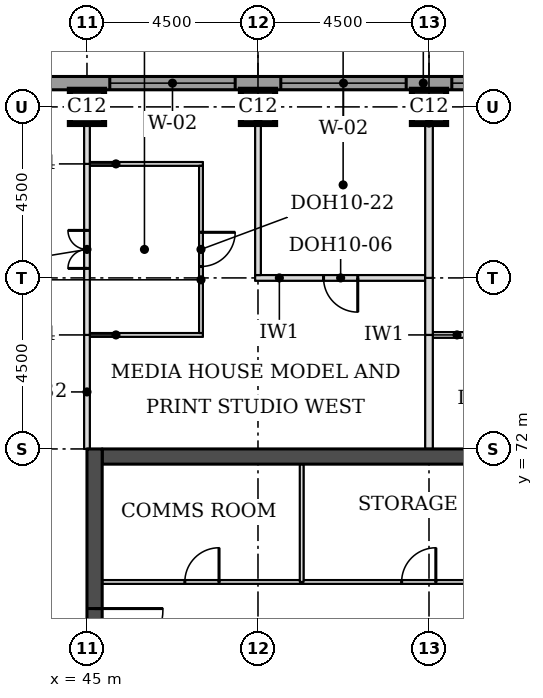
"""IFC4 building model, lengths in metres.
Left out: names, types, materials, properties, quantities, classifications, styles, units other than length and angle.
Written with IfcOpenShell. Run it as: python <this file> out.ifc"""

import sys

from ifc_helpers import new_model, si_unit, direction, frame, frame_2d, origin, origin_2d, place, context, subcontext, project, spatial, rectangle, extrude, element, fill, save


model = new_model("IFC4")
c1 = context("Model", 3, precision=1e-05, world=origin(), true_north=direction((0.0, 1.0)))
c2 = subcontext(c1, "Body", "Model", "MODEL_VIEW")
j1 = project(units=[si_unit("LENGTHUNIT", "METRE"), si_unit("PLANEANGLEUNIT", "RADIAN")], contexts=[c1])
p1 = place(None, origin())
s1 = spatial("IfcSite", under=j1, at=p1, CompositionType="ELEMENT")
p2 = place(p1, origin())
s2 = spatial("IfcBuilding", under=s1, at=p2, CompositionType="ELEMENT")
p3 = place(p2, frame((0.0, 0.0, 223.0)))
s3 = spatial("IfcBuildingStorey", under=s2, at=p3, CompositionType="ELEMENT", Elevation=223.0)
for number, where, z_axis, x_axis in (
    (1, (45.0, 81.0, 0.0), (0.0, 0.0, 1.0), (1.0, 0.0, 0.0)),
    (2, (49.5, 81.0, 0.0), (0.0, 0.0, 1.0), (1.0, 0.0, 0.0)),
    (3, (54.0, 81.0, 0.0), (0.0, 0.0, 1.0), (1.0, 0.0, 0.0)),
):
    element("IfcColumn", number, at=place(p3, frame(where, z_axis=z_axis, x_axis=x_axis)), inside=s3, PredefinedType="COLUMN", context=c2, shape_type="SweptSolid", body=[
        extrude(rectangle(XDim=0.9, YDim=0.9, at=origin_2d()), origin(), (0.0, 0.0, 1.0), 3.7),
    ])
p4 = place(p3, frame((45.4, 71.8, 0.0), z_axis=(0.0, 0.0, 1.0), x_axis=(1.0, 0.0, 0.0)))
e4 = element("IfcWall", 4, at=p4, inside=s3, PredefinedType="SHEAR", context=c2, shape_type="SweptSolid", body=[
    extrude(rectangle(XDim=21.7, YDim=0.4, at=frame_2d((10.85, 0.0))), origin(), (0.0, 0.0, 1.0), 3.7),
])
p5 = place(p3, frame((45.2, 49.5, 0.0), z_axis=(0.0, 0.0, 1.0), x_axis=(0.0, 1.0, 0.0)))
e5 = element("IfcWall", 5, at=p5, inside=s3, PredefinedType="SHEAR", context=c2, shape_type="SweptSolid", body=[
    extrude(rectangle(XDim=22.5, YDim=0.4, at=frame_2d((11.25, 0.0))), origin(), (0.0, 0.0, 1.0), 3.7),
])
p6 = place(p5, frame((4.2, 0.0, 0.0)))
e6 = element("IfcOpeningElement", 6, at=p6, cuts=e5, PredefinedType="OPENING", context=c2, shape_type="SweptSolid", body=[
    extrude(rectangle(XDim=1.8, YDim=2.1, at=frame_2d((0.9, 1.05))), frame((0.0, 0.21, 0.0), z_axis=(0.0, -1.0, 0.0), x_axis=(1.0, 0.0, 0.0)), (0.0, 0.0, 1.0), 0.42),
])
p7 = place(p5, frame((6.9, 0.0, 0.0)))
e7 = element("IfcOpeningElement", 7, at=p7, cuts=e5, PredefinedType="OPENING", context=c2, shape_type="SweptSolid", body=[
    extrude(rectangle(XDim=1.1, YDim=2.1, at=frame_2d((0.55, 1.05))), frame((0.0, 0.21, 0.0), z_axis=(0.0, -1.0, 0.0), x_axis=(1.0, 0.0, 0.0)), (0.0, 0.0, 1.0), 0.42),
])
p8 = place(p5, frame((13.6, 0.0, 0.0)))
e8 = element("IfcOpeningElement", 8, at=p8, cuts=e5, PredefinedType="OPENING", context=c2, shape_type="SweptSolid", body=[
    extrude(rectangle(XDim=1.1, YDim=2.1, at=frame_2d((0.55, 1.05))), frame((0.0, 0.21, 0.0), z_axis=(0.0, -1.0, 0.0), x_axis=(1.0, 0.0, 0.0)), (0.0, 0.0, 1.0), 0.42),
])
p9 = place(p5, frame((16.5, 0.0, 0.0)))
e9 = element("IfcOpeningElement", 9, at=p9, cuts=e5, PredefinedType="OPENING", context=c2, shape_type="SweptSolid", body=[
    extrude(rectangle(XDim=1.8, YDim=2.1, at=frame_2d((0.9, 1.05))), frame((0.0, 0.21, 0.0), z_axis=(0.0, -1.0, 0.0), x_axis=(1.0, 0.0, 0.0)), (0.0, 0.0, 1.0), 0.42),
])
p10 = place(p3, frame((72.331, 81.625, 0.0), z_axis=(0.0, 0.0, 1.0), x_axis=(-1.0, 0.0, 0.0)))
e10 = element("IfcWall", 10, at=p10, inside=s3, PredefinedType="STANDARD", context=c2, shape_type="SweptSolid", body=[
    extrude(rectangle(XDim=32.163, YDim=0.35, at=frame_2d((16.081, 0.0))), origin(), (0.0, 0.0, 1.0), 3.525),
])
p11 = place(p10, frame((5.431, 0.0, 0.9)))
e11 = element("IfcOpeningElement", 11, at=p11, cuts=e10, PredefinedType="OPENING", context=c2, shape_type="SweptSolid", body=[
    extrude(rectangle(XDim=3.3, YDim=1.9, at=frame_2d((1.65, 0.95))), frame((0.0, 0.185, 0.0), z_axis=(0.0, -1.0, 0.0), x_axis=(1.0, 0.0, 0.0)), (0.0, 0.0, 1.0), 0.37),
])
p12 = place(p10, frame((9.931, 0.0, 0.9)))
e12 = element("IfcOpeningElement", 12, at=p12, cuts=e10, PredefinedType="OPENING", context=c2, shape_type="SweptSolid", body=[
    extrude(rectangle(XDim=3.3, YDim=1.9, at=frame_2d((1.65, 0.95))), frame((0.0, 0.185, 0.0), z_axis=(0.0, -1.0, 0.0), x_axis=(1.0, 0.0, 0.0)), (0.0, 0.0, 1.0), 0.37),
])
p13 = place(p10, frame((14.431, 0.0, 0.9)))
e13 = element("IfcOpeningElement", 13, at=p13, cuts=e10, PredefinedType="OPENING", context=c2, shape_type="SweptSolid", body=[
    extrude(rectangle(XDim=3.3, YDim=1.9, at=frame_2d((1.65, 0.95))), frame((0.0, 0.185, 0.0), z_axis=(0.0, -1.0, 0.0), x_axis=(1.0, 0.0, 0.0)), (0.0, 0.0, 1.0), 0.37),
])
p14 = place(p10, frame((18.931, 0.0, 0.9)))
e14 = element("IfcOpeningElement", 14, at=p14, cuts=e10, PredefinedType="OPENING", context=c2, shape_type="SweptSolid", body=[
    extrude(rectangle(XDim=3.3, YDim=1.9, at=frame_2d((1.65, 0.95))), frame((0.0, 0.185, 0.0), z_axis=(0.0, -1.0, 0.0), x_axis=(1.0, 0.0, 0.0)), (0.0, 0.0, 1.0), 0.37),
])
p15 = place(p10, frame((23.431, 0.0, 0.9)))
e15 = element("IfcOpeningElement", 15, at=p15, cuts=e10, PredefinedType="OPENING", context=c2, shape_type="SweptSolid", body=[
    extrude(rectangle(XDim=3.3, YDim=1.9, at=frame_2d((1.65, 0.95))), frame((0.0, 0.185, 0.0), z_axis=(0.0, -1.0, 0.0), x_axis=(1.0, 0.0, 0.0)), (0.0, 0.0, 1.0), 0.37),
])
p16 = place(p3, frame((45.075, 75.0, 0.0), z_axis=(0.0, 0.0, 1.0), x_axis=(1.0, 0.0, 0.0)))
e16 = element("IfcWall", 16, at=p16, inside=s3, PredefinedType="PARTITIONING", context=c2, shape_type="SweptSolid", body=[
    extrude(rectangle(XDim=2.975, YDim=0.1, at=frame_2d((1.488, 0.0))), origin(), (0.0, 0.0, 1.0), 3.55),
])
p17 = place(p3, frame((54.1, 75.0, 0.0), z_axis=(0.0, 0.0, 1.0), x_axis=(1.0, 0.0, 0.0)))
e17 = element("IfcWall", 17, at=p17, inside=s3, PredefinedType="PARTITIONING", context=c2, shape_type="SweptSolid", body=[
    extrude(rectangle(XDim=4.475, YDim=0.15, at=frame_2d((2.237, 0.0))), origin(), (0.0, 0.0, 1.0), 3.55),
])
p18 = place(p17, frame((1.8, 0.0, 0.0)))
e18 = element("IfcOpeningElement", 18, at=p18, cuts=e17, PredefinedType="OPENING", context=c2, shape_type="SweptSolid", body=[
    extrude(rectangle(XDim=0.9, YDim=2.1, at=frame_2d((0.45, 1.05))), frame((0.0, 0.085, 0.0), z_axis=(0.0, -1.0, 0.0), x_axis=(1.0, 0.0, 0.0)), (0.0, 0.0, 1.0), 0.17),
])
p19 = place(p3, frame((49.425, 76.5, 0.0), z_axis=(0.0, 0.0, 1.0), x_axis=(1.0, 0.0, 0.0)))
e19 = element("IfcWall", 19, at=p19, inside=s3, PredefinedType="PARTITIONING", context=c2, shape_type="SweptSolid", body=[
    extrude(rectangle(XDim=4.475, YDim=0.15, at=frame_2d((2.237, 0.0))), origin(), (0.0, 0.0, 1.0), 3.55),
])
p20 = place(p19, frame((1.8, 0.0, 0.0)))
e20 = element("IfcOpeningElement", 20, at=p20, cuts=e19, PredefinedType="OPENING", context=c2, shape_type="SweptSolid", body=[
    extrude(rectangle(XDim=0.9, YDim=2.1, at=frame_2d((0.45, 1.05))), frame((0.0, 0.085, 0.0), z_axis=(0.0, -1.0, 0.0), x_axis=(1.0, 0.0, 0.0)), (0.0, 0.0, 1.0), 0.17),
])
p21 = place(p3, frame((45.075, 79.5, 0.0), z_axis=(0.0, 0.0, 1.0), x_axis=(1.0, 0.0, 0.0)))
e21 = element("IfcWall", 21, at=p21, inside=s3, PredefinedType="PARTITIONING", context=c2, shape_type="SweptSolid", body=[
    extrude(rectangle(XDim=2.975, YDim=0.1, at=frame_2d((1.488, 0.0))), origin(), (0.0, 0.0, 1.0), 3.55),
])
p22 = place(p3, frame((45.0, 72.0, 0.0), z_axis=(0.0, 0.0, 1.0), x_axis=(0.0, 1.0, 0.0)))
e22 = element("IfcWall", 22, at=p22, inside=s3, PredefinedType="PARTITIONING", context=c2, shape_type="SweptSolid", body=[
    extrude(rectangle(XDim=3.0, YDim=0.15, at=frame_2d((1.5, 0.0))), origin(), (0.0, 0.0, 1.0), 3.022),
])
p23 = place(p3, frame((54.0, 72.0, 0.0), z_axis=(0.0, 0.0, 1.0), x_axis=(0.0, 1.0, 0.0)))
e23 = element("IfcWall", 23, at=p23, inside=s3, PredefinedType="PARTITIONING", context=c2, shape_type="SweptSolid", body=[
    extrude(rectangle(XDim=3.0, YDim=0.2, at=frame_2d((1.5, 0.0))), origin(), (0.0, 0.0, 1.0), 3.55),
])
p24 = place(p3, frame((45.0, 75.0, 0.0), z_axis=(0.0, 0.0, 1.0), x_axis=(0.0, 1.0, 0.0)))
e24 = element("IfcWall", 24, at=p24, inside=s3, PredefinedType="PARTITIONING", context=c2, shape_type="SweptSolid", body=[
    extrude(rectangle(XDim=4.5, YDim=0.15, at=frame_2d((2.25, 0.0))), origin(), (0.0, 0.0, 1.0), 3.022),
])
p25 = place(p24, frame((1.75, 0.0, 0.0)))
e25 = element("IfcOpeningElement", 25, at=p25, cuts=e24, PredefinedType="OPENING", context=c2, shape_type="SweptSolid", body=[
    extrude(rectangle(XDim=1.0, YDim=2.1, at=frame_2d((0.5, 1.05))), frame((0.0, 0.085, 0.0), z_axis=(0.0, -1.0, 0.0), x_axis=(1.0, 0.0, 0.0)), (0.0, 0.0, 1.0), 0.17),
])
p26 = place(p3, frame((54.0, 75.0, 0.0), z_axis=(0.0, 0.0, 1.0), x_axis=(0.0, 1.0, 0.0)))
e26 = element("IfcWall", 26, at=p26, inside=s3, PredefinedType="PARTITIONING", context=c2, shape_type="SweptSolid", body=[
    extrude(rectangle(XDim=1.5, YDim=0.2, at=frame_2d((0.75, 0.0))), origin(), (0.0, 0.0, 1.0), 3.55),
])
p27 = place(p3, frame((48.0, 75.05, 0.0), z_axis=(0.0, 0.0, 1.0), x_axis=(0.0, 1.0, 0.0)))
e27 = element("IfcWall", 27, at=p27, inside=s3, PredefinedType="PARTITIONING", context=c2, shape_type="SweptSolid", body=[
    extrude(rectangle(XDim=4.4, YDim=0.1, at=frame_2d((2.2, 0.0))), origin(), (0.0, 0.0, 1.0), 3.55),
])
p28 = place(p27, frame((1.75, 0.0, 0.0)))
e28 = element("IfcOpeningElement", 28, at=p28, cuts=e27, PredefinedType="OPENING", context=c2, shape_type="SweptSolid", body=[
    extrude(rectangle(XDim=0.9, YDim=2.1, at=frame_2d((0.45, 1.05))), frame((0.0, 0.06, 0.0), z_axis=(0.0, -1.0, 0.0), x_axis=(1.0, 0.0, 0.0)), (0.0, 0.0, 1.0), 0.12),
])
p29 = place(p3, frame((54.0, 76.5, 0.0), z_axis=(0.0, 0.0, 1.0), x_axis=(0.0, 1.0, 0.0)))
e29 = element("IfcWall", 29, at=p29, inside=s3, PredefinedType="PARTITIONING", context=c2, shape_type="SweptSolid", body=[
    extrude(rectangle(XDim=4.95, YDim=0.2, at=frame_2d((2.475, 0.0))), origin(), (0.0, 0.0, 1.0), 3.55),
])
p30 = place(p3, frame((49.5, 76.575, 0.0), z_axis=(0.0, 0.0, 1.0), x_axis=(0.0, 1.0, 0.0)))
e30 = element("IfcWall", 30, at=p30, inside=s3, PredefinedType="PARTITIONING", context=c2, shape_type="SweptSolid", body=[
    extrude(rectangle(XDim=4.875, YDim=0.15, at=frame_2d((2.438, 0.0))), origin(), (0.0, 0.0, 1.0), 3.55),
])
p31 = place(p3, frame((45.0, 79.5, 0.0), z_axis=(0.0, 0.0, 1.0), x_axis=(0.0, 1.0, 0.0)))
e31 = element("IfcWall", 31, at=p31, inside=s3, PredefinedType="PARTITIONING", context=c2, shape_type="SweptSolid", body=[
    extrude(rectangle(XDim=1.95, YDim=0.15, at=frame_2d((0.975, 0.0))), origin(), (0.0, 0.0, 1.0), 3.022),
])
p32 = place(p3, frame((45.4, 68.5, 0.0), z_axis=(0.0, 0.0, 1.0), x_axis=(1.0, 0.0, 0.0)))
e32 = element("IfcWall", 32, at=p32, inside=s3, PredefinedType="PARTITIONING", context=c2, shape_type="SweptSolid", body=[
    extrude(rectangle(XDim=21.7, YDim=0.1, at=frame_2d((10.85, 0.0))), origin(), (0.0, 0.0, 1.0), 3.55),
])
p33 = place(p32, frame((20.069, 0.0, 0.0)))
e33 = element("IfcOpeningElement", 33, at=p33, cuts=e32, PredefinedType="OPENING", context=c2, shape_type="SweptSolid", body=[
    extrude(rectangle(XDim=0.9, YDim=2.1, at=frame_2d((0.45, 1.05))), frame((0.0, 0.06, 0.0), z_axis=(0.0, -1.0, 0.0), x_axis=(1.0, 0.0, 0.0)), (0.0, 0.0, 1.0), 0.12),
])
p34 = place(p32, frame((17.444, 0.0, 0.0)))
e34 = element("IfcOpeningElement", 34, at=p34, cuts=e32, PredefinedType="OPENING", context=c2, shape_type="SweptSolid", body=[
    extrude(rectangle(XDim=0.9, YDim=2.1, at=frame_2d((0.45, 1.05))), frame((0.0, 0.06, 0.0), z_axis=(0.0, -1.0, 0.0), x_axis=(1.0, 0.0, 0.0)), (0.0, 0.0, 1.0), 0.12),
])
p35 = place(p32, frame((2.175, 0.0, 0.0)))
e35 = element("IfcOpeningElement", 35, at=p35, cuts=e32, PredefinedType="OPENING", context=c2, shape_type="SweptSolid", body=[
    extrude(rectangle(XDim=0.9, YDim=2.1, at=frame_2d((0.45, 1.05))), frame((0.0, 0.06, 0.0), z_axis=(0.0, -1.0, 0.0), x_axis=(1.0, 0.0, 0.0)), (0.0, 0.0, 1.0), 0.12),
])
p36 = place(p32, frame((13.48, 0.0, 0.0)))
e36 = element("IfcOpeningElement", 36, at=p36, cuts=e32, PredefinedType="OPENING", context=c2, shape_type="SweptSolid", body=[
    extrude(rectangle(XDim=0.9, YDim=2.1, at=frame_2d((0.45, 1.05))), frame((0.0, 0.06, 0.0), z_axis=(0.0, -1.0, 0.0), x_axis=(1.0, 0.0, 0.0)), (0.0, 0.0, 1.0), 0.12),
])
p37 = place(p32, frame((7.88, 0.0, 0.0)))
e37 = element("IfcOpeningElement", 37, at=p37, cuts=e32, PredefinedType="OPENING", context=c2, shape_type="SweptSolid", body=[
    extrude(rectangle(XDim=0.9, YDim=2.1, at=frame_2d((0.45, 1.05))), frame((0.0, 0.06, 0.0), z_axis=(0.0, -1.0, 0.0), x_axis=(1.0, 0.0, 0.0)), (0.0, 0.0, 1.0), 0.12),
])
p38 = place(p3, frame((50.65, 68.5, 0.0), z_axis=(0.0, 0.0, 1.0), x_axis=(0.0, 1.0, 0.0)))
e38 = element("IfcWall", 38, at=p38, inside=s3, PredefinedType="PARTITIONING", context=c2, shape_type="SweptSolid", body=[
    extrude(rectangle(XDim=3.1, YDim=0.1, at=frame_2d((1.55, 0.0))), origin(), (0.0, 0.0, 1.0), 3.55),
])
p39 = place(p13, origin())
e39 = element("IfcWindow", 39, at=p39, inside=s3, PartitioningType="SINGLE_PANEL", PredefinedType="WINDOW", context=c2, shape_type="SweptSolid", body=[
    extrude(rectangle(XDim=3.3, YDim=1.9, at=frame_2d((1.65, 0.95))), frame((0.0, 0.085, 0.0), z_axis=(0.0, -1.0, 0.0), x_axis=(1.0, 0.0, 0.0)), (0.0, 0.0, 1.0), 0.06),
])
fill(e13, e39)
p40 = place(p14, origin())
e40 = element("IfcWindow", 40, at=p40, inside=s3, PartitioningType="SINGLE_PANEL", PredefinedType="WINDOW", context=c2, shape_type="SweptSolid", body=[
    extrude(rectangle(XDim=3.3, YDim=1.9, at=frame_2d((1.65, 0.95))), frame((0.0, 0.085, 0.0), z_axis=(0.0, -1.0, 0.0), x_axis=(1.0, 0.0, 0.0)), (0.0, 0.0, 1.0), 0.06),
])
fill(e14, e40)
p41 = place(p15, origin())
e41 = element("IfcWindow", 41, at=p41, inside=s3, PartitioningType="SINGLE_PANEL", PredefinedType="WINDOW", context=c2, shape_type="SweptSolid", body=[
    extrude(rectangle(XDim=3.3, YDim=1.9, at=frame_2d((1.65, 0.95))), frame((0.0, 0.085, 0.0), z_axis=(0.0, -1.0, 0.0), x_axis=(1.0, 0.0, 0.0)), (0.0, 0.0, 1.0), 0.06),
])
fill(e15, e41)
p42 = place(p25, origin())
e42 = element("IfcDoor", 42, at=p42, inside=s3, OperationType="DOUBLE_DOOR_SINGLE_SWING", PredefinedType="DOOR", context=c2, shape_type="SweptSolid", body=[
    extrude(rectangle(XDim=1.0, YDim=2.1, at=frame_2d((0.5, 1.05))), frame((0.0, 0.025, 0.0), z_axis=(0.0, -1.0, 0.0), x_axis=(1.0, 0.0, 0.0)), (0.0, 0.0, 1.0), 0.05),
])
fill(e25, e42)
p43 = place(p28, frame((0.9, 0.0, 0.0), z_axis=(0.0, 0.0, 1.0), x_axis=(-1.0, 0.0, 0.0)))
e43 = element("IfcDoor", 43, at=p43, inside=s3, OperationType="SINGLE_SWING_LEFT", PredefinedType="DOOR", context=c2, shape_type="SweptSolid", body=[
    extrude(rectangle(XDim=0.9, YDim=2.1, at=frame_2d((0.45, 1.05))), frame((0.0, 0.025, 0.0), z_axis=(0.0, -1.0, 0.0), x_axis=(1.0, 0.0, 0.0)), (0.0, 0.0, 1.0), 0.05),
])
fill(e28, e43)
p44 = place(p20, frame((0.9, 0.0, 0.0), z_axis=(0.0, 0.0, 1.0), x_axis=(-1.0, 0.0, 0.0)))
e44 = element("IfcDoor", 44, at=p44, inside=s3, OperationType="SINGLE_SWING_LEFT", PredefinedType="DOOR", context=c2, shape_type="SweptSolid", body=[
    extrude(rectangle(XDim=0.9, YDim=2.1, at=frame_2d((0.45, 1.05))), frame((0.0, 0.025, 0.0), z_axis=(0.0, -1.0, 0.0), x_axis=(1.0, 0.0, 0.0)), (0.0, 0.0, 1.0), 0.05),
])
fill(e20, e44)
p45 = place(p9, frame((1.8, 0.0, 0.0), z_axis=(0.0, 0.0, 1.0), x_axis=(-1.0, 0.0, 0.0)))
e45 = element("IfcDoor", 45, at=p45, inside=s3, OperationType="SINGLE_SWING_LEFT", PredefinedType="DOOR", context=c2, shape_type="SweptSolid", body=[
    extrude(rectangle(XDim=1.8, YDim=2.1, at=frame_2d((0.9, 1.05))), frame((0.0, 0.025, 0.0), z_axis=(0.0, -1.0, 0.0), x_axis=(1.0, 0.0, 0.0)), (0.0, 0.0, 1.0), 0.05),
])
fill(e9, e45)
p46 = place(p35, origin())
e46 = element("IfcDoor", 46, at=p46, inside=s3, OperationType="SINGLE_SWING_RIGHT", PredefinedType="DOOR", context=c2, shape_type="SweptSolid", body=[
    extrude(rectangle(XDim=0.9, YDim=2.1, at=frame_2d((0.45, 1.05))), frame((0.0, 0.025, 0.0), z_axis=(0.0, -1.0, 0.0), x_axis=(1.0, 0.0, 0.0)), (0.0, 0.0, 1.0), 0.05),
])
fill(e35, e46)
p47 = place(p37, origin())
e47 = element("IfcDoor", 47, at=p47, inside=s3, OperationType="SINGLE_SWING_RIGHT", PredefinedType="DOOR", context=c2, shape_type="SweptSolid", body=[
    extrude(rectangle(XDim=0.9, YDim=2.1, at=frame_2d((0.45, 1.05))), frame((0.0, 0.025, 0.0), z_axis=(0.0, -1.0, 0.0), x_axis=(1.0, 0.0, 0.0)), (0.0, 0.0, 1.0), 0.05),
])
fill(e37, e47)
save(model, sys.argv[1])
